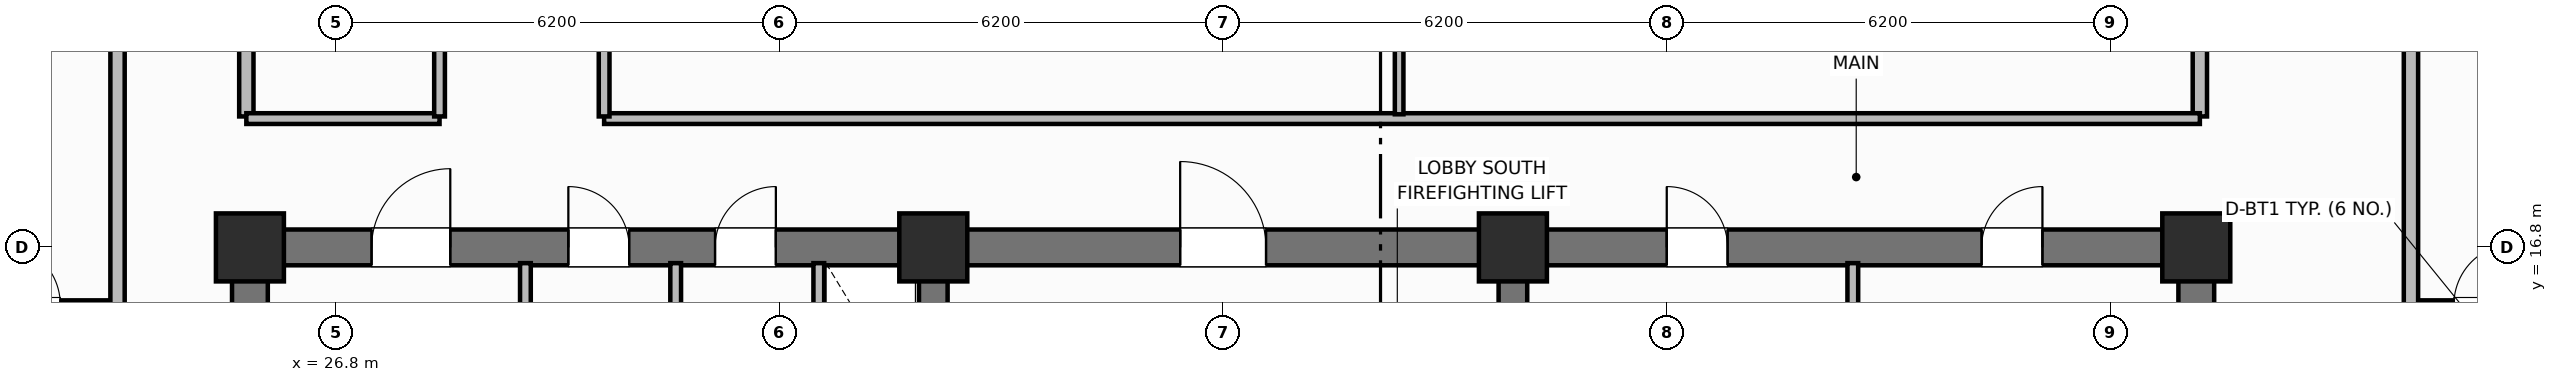
"""IFC4 building model, lengths in metres.
Left out: names, types, materials, properties, quantities, classifications, styles, units other than length and angle.
Written with IfcOpenShell. Run it as: python <this file> out.ifc"""

import sys

from ifc_helpers import new_model, si_unit, direction, frame, frame_2d, origin, origin_2d, place, context, subcontext, project, spatial, rectangle, extrude, element, fill, save


model = new_model("IFC4")
c1 = context("Model", 3, precision=1e-05, world=origin(), true_north=direction((0.0, 1.0)))
c2 = subcontext(c1, "Body", "Model", "MODEL_VIEW")
j1 = project(units=[si_unit("LENGTHUNIT", "METRE"), si_unit("PLANEANGLEUNIT", "RADIAN")], contexts=[c1])
p1 = place(None, origin())
s1 = spatial("IfcSite", under=j1, at=p1, CompositionType="ELEMENT")
p2 = place(p1, origin())
s2 = spatial("IfcBuilding", under=s1, at=p2, CompositionType="ELEMENT")
p3 = place(p2, frame((0.0, 0.0, 188.5)))
s3 = spatial("IfcBuildingStorey", under=s2, at=p3, CompositionType="ELEMENT", Elevation=188.5)
for number, where, z_axis, x_axis in (
    (1, (25.6, 10.85, 0.0), (0.0, 0.0, 1.0), (0.0, 1.0, 0.0)),
    (2, (52.8, 10.85, 0.0), (0.0, 0.0, 1.0), (0.0, 1.0, 0.0)),
):
    element("IfcWall", number, at=place(p3, frame(where, z_axis=z_axis, x_axis=x_axis)), inside=s3, PredefinedType="SHEAR", context=c2, shape_type="SweptSolid", body=[
        extrude(rectangle(XDim=5.7, YDim=0.5, at=frame_2d((2.85, 0.0))), origin(), (0.0, 0.0, 1.0), 3.7),
    ])
p4 = place(p3, frame((25.6, 16.8, 0.0), z_axis=(0.0, 0.0, 1.0), x_axis=(1.0, 0.0, 0.0)))
e3 = element("IfcWall", 3, at=p4, inside=s3, PredefinedType="SHEAR", context=c2, shape_type="SweptSolid", body=[
    extrude(rectangle(XDim=27.2, YDim=0.5, at=frame_2d((13.6, 0.0))), origin(), (0.0, 0.0, 1.0), 3.7),
])
p5 = place(p4, frame((1.7, 0.0, 0.0)))
e4 = element("IfcOpeningElement", 4, at=p5, cuts=e3, PredefinedType="OPENING", context=c2, shape_type="SweptSolid", body=[
    extrude(rectangle(XDim=1.1, YDim=2.15, at=frame_2d((0.55, 1.075))), frame((0.0, 0.26, 0.0), z_axis=(0.0, -1.0, 0.0), x_axis=(1.0, 0.0, 0.0)), (0.0, 0.0, 1.0), 0.52),
])
p6 = place(p4, frame((4.45, 0.0, 0.0)))
e5 = element("IfcOpeningElement", 5, at=p6, cuts=e3, PredefinedType="OPENING", context=c2, shape_type="SweptSolid", body=[
    extrude(rectangle(XDim=0.85, YDim=2.1, at=frame_2d((0.425, 1.05))), frame((0.0, 0.26, 0.0), z_axis=(0.0, -1.0, 0.0), x_axis=(1.0, 0.0, 0.0)), (0.0, 0.0, 1.0), 0.52),
])
p7 = place(p4, frame((6.5, 0.0, 0.0)))
e6 = element("IfcOpeningElement", 6, at=p7, cuts=e3, PredefinedType="OPENING", context=c2, shape_type="SweptSolid", body=[
    extrude(rectangle(XDim=0.85, YDim=2.1, at=frame_2d((0.425, 1.05))), frame((0.0, 0.26, 0.0), z_axis=(0.0, -1.0, 0.0), x_axis=(1.0, 0.0, 0.0)), (0.0, 0.0, 1.0), 0.52),
])
p8 = place(p4, frame((13.0, 0.0, 0.0)))
e7 = element("IfcOpeningElement", 7, at=p8, cuts=e3, PredefinedType="OPENING", context=c2, shape_type="SweptSolid", body=[
    extrude(rectangle(XDim=1.2, YDim=2.15, at=frame_2d((0.6, 1.075))), frame((0.0, 0.26, 0.0), z_axis=(0.0, -1.0, 0.0), x_axis=(1.0, 0.0, 0.0)), (0.0, 0.0, 1.0), 0.52),
])
p9 = place(p4, frame((19.8, 0.0, 0.0)))
e8 = element("IfcOpeningElement", 8, at=p9, cuts=e3, PredefinedType="OPENING", context=c2, shape_type="SweptSolid", body=[
    extrude(rectangle(XDim=0.85, YDim=2.1, at=frame_2d((0.425, 1.05))), frame((0.0, 0.26, 0.0), z_axis=(0.0, -1.0, 0.0), x_axis=(1.0, 0.0, 0.0)), (0.0, 0.0, 1.0), 0.52),
])
p10 = place(p4, frame((24.2, 0.0, 0.0)))
e9 = element("IfcOpeningElement", 9, at=p10, cuts=e3, PredefinedType="OPENING", context=c2, shape_type="SweptSolid", body=[
    extrude(rectangle(XDim=0.85, YDim=2.1, at=frame_2d((0.425, 1.05))), frame((0.0, 0.26, 0.0), z_axis=(0.0, -1.0, 0.0), x_axis=(1.0, 0.0, 0.0)), (0.0, 0.0, 1.0), 0.52),
])
for number, where, z_axis, x_axis in (
    (10, (35.15, 10.85, 0.0), (0.0, 0.0, 1.0), (0.0, 1.0, 0.0)),
    (11, (43.25, 10.85, 0.0), (0.0, 0.0, 1.0), (0.0, 1.0, 0.0)),
):
    element("IfcWall", number, at=place(p3, frame(where, z_axis=z_axis, x_axis=x_axis)), inside=s3, PredefinedType="SHEAR", context=c2, shape_type="SweptSolid", body=[
        extrude(rectangle(XDim=5.7, YDim=0.4, at=frame_2d((2.85, 0.0))), origin(), (0.0, 0.0, 1.0), 3.7),
    ])
for number, where, z_axis, x_axis in (
    (12, (25.6, 16.8, 0.0), (0.0, 0.0, 1.0), (1.0, 0.0, 0.0)),
    (13, (35.15, 16.8, 0.0), (0.0, 0.0, 1.0), (1.0, 0.0, 0.0)),
    (14, (43.25, 16.8, 0.0), (0.0, 0.0, 1.0), (1.0, 0.0, 0.0)),
    (15, (52.8, 16.8, 0.0), (0.0, 0.0, 1.0), (1.0, 0.0, 0.0)),
):
    element("IfcColumn", number, at=place(p3, frame(where, z_axis=z_axis, x_axis=x_axis)), inside=s3, PredefinedType="COLUMN", context=c2, shape_type="SweptSolid", body=[
        extrude(rectangle(XDim=0.95, YDim=0.95, at=origin_2d()), origin(), (0.0, 0.0, 1.0), 3.7),
    ])
for number, where, z_axis, x_axis in (
    (16, (29.45, 14.5, 0.0), (0.0, 0.0, 1.0), (0.0, 1.0, 0.0)),
    (17, (31.55, 14.5, 0.0), (0.0, 0.0, 1.0), (0.0, 1.0, 0.0)),
):
    element("IfcWall", number, at=place(p3, frame(where, z_axis=z_axis, x_axis=x_axis)), inside=s3, PredefinedType="PARTITIONING", context=c2, shape_type="SweptSolid", body=[
        extrude(rectangle(XDim=2.08, YDim=0.15, at=frame_2d((1.04, 0.0))), origin(), (0.0, 0.0, 1.0), 2.55),
    ])
p11 = place(p3, frame((33.55, 14.5, 0.0), z_axis=(0.0, 0.0, 1.0), x_axis=(0.0, 1.0, 0.0)))
e18 = element("IfcWall", 18, at=p11, inside=s3, PredefinedType="PARTITIONING", context=c2, shape_type="SweptSolid", body=[
    extrude(rectangle(XDim=2.08, YDim=0.15, at=frame_2d((1.04, 0.0))), origin(), (0.0, 0.0, 1.0), 2.55),
])
p12 = place(p11, frame((0.55, 0.0, 0.0)))
e19 = element("IfcOpeningElement", 19, at=p12, cuts=e18, PredefinedType="OPENING", context=c2, shape_type="SweptSolid", body=[
    extrude(rectangle(XDim=0.85, YDim=2.05, at=frame_2d((0.425, 1.025))), frame((0.0, 0.085, 0.0), z_axis=(0.0, -1.0, 0.0), x_axis=(1.0, 0.0, 0.0)), (0.0, 0.0, 1.0), 0.17),
])
p13 = place(p3, frame((48.0, 10.95, 0.0), z_axis=(0.0, 0.0, 1.0), x_axis=(0.0, 1.0, 0.0)))
e20 = element("IfcWall", 20, at=p13, inside=s3, PredefinedType="PARTITIONING", context=c2, shape_type="SweptSolid", body=[
    extrude(rectangle(XDim=5.63, YDim=0.15, at=frame_2d((2.815, 0.0))), origin(), (0.0, 0.0, 1.0), 2.55),
])
for number, where, z_axis, x_axis in (
    (21, (25.55, 18.63, 0.0), (0.0, 0.0, 1.0), (0.0, 1.0, 0.0)),
    (22, (52.85, 18.63, 0.0), (0.0, 0.0, 1.0), (0.0, 1.0, 0.0)),
):
    element("IfcWall", number, at=place(p3, frame(where, z_axis=z_axis, x_axis=x_axis)), inside=s3, PredefinedType="PARTITIONING", context=c2, shape_type="SweptSolid", body=[
        extrude(rectangle(XDim=19.14, YDim=0.2, at=frame_2d((9.57, 0.0))), origin(), (0.0, 0.0, 1.0), 2.55),
    ])
p14 = place(p3, frame((25.55, 18.6, 0.0), z_axis=(0.0, 0.0, 1.0), x_axis=(1.0, 0.0, 0.0)))
e23 = element("IfcWall", 23, at=p14, inside=s3, PredefinedType="PARTITIONING", context=c2, shape_type="SweptSolid", body=[
    extrude(rectangle(XDim=2.7, YDim=0.15, at=frame_2d((1.35, 0.0))), origin(), (0.0, 0.0, 1.0), 2.55),
])
p15 = place(p3, frame((30.55, 18.6, 0.0), z_axis=(0.0, 0.0, 1.0), x_axis=(1.0, 0.0, 0.0)))
e24 = element("IfcWall", 24, at=p15, inside=s3, PredefinedType="PARTITIONING", context=c2, shape_type="SweptSolid", body=[
    extrude(rectangle(XDim=22.3, YDim=0.15, at=frame_2d((11.15, 0.0))), origin(), (0.0, 0.0, 1.0), 2.55),
])
p16 = place(p3, frame((41.66, 18.66, 0.0), z_axis=(0.0, 0.0, 1.0), x_axis=(0.0, 1.0, 0.0)))
e25 = element("IfcWall", 25, at=p16, inside=s3, PredefinedType="PARTITIONING", context=c2, shape_type="SweptSolid", body=[
    extrude(rectangle(XDim=6.821, YDim=0.12, at=frame_2d((3.41, 0.0))), origin(), (0.0, 0.0, 1.0), 2.55),
])
p17 = place(p16, frame((2.0, 0.0, 0.0)))
e26 = element("IfcOpeningElement", 26, at=p17, cuts=e25, PredefinedType="OPENING", context=c2, shape_type="SweptSolid", body=[
    extrude(rectangle(XDim=0.9, YDim=2.1, at=frame_2d((0.45, 1.05))), frame((0.0, 0.07, 0.0), z_axis=(0.0, -1.0, 0.0), x_axis=(1.0, 0.0, 0.0)), (0.0, 0.0, 1.0), 0.14),
])
p18 = place(p3, frame((28.25, 18.63, 0.0), z_axis=(0.0, 0.0, 1.0), x_axis=(0.0, 1.0, 0.0)))
e27 = element("IfcWall", 27, at=p18, inside=s3, PredefinedType="PARTITIONING", context=c2, shape_type="SweptSolid", body=[
    extrude(rectangle(XDim=19.14, YDim=0.15, at=frame_2d((9.57, 0.0))), origin(), (0.0, 0.0, 1.0), 2.55),
])
p19 = place(p18, frame((3.0, 0.0, 0.0)))
e28 = element("IfcOpeningElement", 28, at=p19, cuts=e27, PredefinedType="OPENING", context=c2, shape_type="SweptSolid", body=[
    extrude(rectangle(XDim=0.9, YDim=2.1, at=frame_2d((0.45, 1.05))), frame((0.0, 0.085, 0.0), z_axis=(0.0, -1.0, 0.0), x_axis=(1.0, 0.0, 0.0)), (0.0, 0.0, 1.0), 0.17),
])
p20 = place(p18, frame((11.5, 0.0, 0.0)))
e29 = element("IfcOpeningElement", 29, at=p20, cuts=e27, PredefinedType="OPENING", context=c2, shape_type="SweptSolid", body=[
    extrude(rectangle(XDim=0.9, YDim=2.1, at=frame_2d((0.45, 1.05))), frame((0.0, 0.085, 0.0), z_axis=(0.0, -1.0, 0.0), x_axis=(1.0, 0.0, 0.0)), (0.0, 0.0, 1.0), 0.17),
])
p21 = place(p3, frame((30.55, 18.63, 0.0), z_axis=(0.0, 0.0, 1.0), x_axis=(0.0, 1.0, 0.0)))
e30 = element("IfcWall", 30, at=p21, inside=s3, PredefinedType="PARTITIONING", context=c2, shape_type="SweptSolid", body=[
    extrude(rectangle(XDim=19.14, YDim=0.15, at=frame_2d((9.57, 0.0))), origin(), (0.0, 0.0, 1.0), 2.55),
])
p22 = place(p21, frame((2.2, 0.0, 0.0)))
e31 = element("IfcOpeningElement", 31, at=p22, cuts=e30, PredefinedType="OPENING", context=c2, shape_type="SweptSolid", body=[
    extrude(rectangle(XDim=1.0, YDim=2.15, at=frame_2d((0.5, 1.075))), frame((0.0, 0.085, 0.0), z_axis=(0.0, -1.0, 0.0), x_axis=(1.0, 0.0, 0.0)), (0.0, 0.0, 1.0), 0.17),
])
p23 = place(p21, frame((8.89, 0.0, 0.0)))
e32 = element("IfcOpeningElement", 32, at=p23, cuts=e30, PredefinedType="OPENING", context=c2, shape_type="SweptSolid", body=[
    extrude(rectangle(XDim=1.0, YDim=2.15, at=frame_2d((0.5, 1.075))), frame((0.0, 0.085, 0.0), z_axis=(0.0, -1.0, 0.0), x_axis=(1.0, 0.0, 0.0)), (0.0, 0.0, 1.0), 0.17),
])
p24 = place(p3, frame((21.5, 16.0, 0.0), z_axis=(0.0, 0.0, 1.0), x_axis=(1.0, 0.0, 0.0)))
e33 = element("IfcWall", 33, at=p24, inside=s3, PredefinedType="PARTITIONING", context=c2, shape_type="SweptSolid", body=[
    extrude(rectangle(XDim=2.25, YDim=0.12, at=frame_2d((1.125, 0.0))), origin(), (0.0, 0.0, 1.0), 2.55),
])
p25 = place(p24, frame((0.6, 0.0, 0.0)))
e34 = element("IfcOpeningElement", 34, at=p25, cuts=e33, PredefinedType="OPENING", context=c2, shape_type="SweptSolid", body=[
    extrude(rectangle(XDim=0.85, YDim=2.1, at=frame_2d((0.425, 1.05))), frame((0.0, 0.07, 0.0), z_axis=(0.0, -1.0, 0.0), x_axis=(1.0, 0.0, 0.0)), (0.0, 0.0, 1.0), 0.14),
])
p26 = place(p3, frame((23.75, 10.6, 0.0), z_axis=(0.0, 0.0, 1.0), x_axis=(0.0, 1.0, 0.0)))
e35 = element("IfcWall", 35, at=p26, inside=s3, PredefinedType="PARTITIONING", context=c2, shape_type="SweptSolid", body=[
    extrude(rectangle(XDim=35.2, YDim=0.2, at=frame_2d((17.6, 0.0))), origin(), (0.0, 0.0, 1.0), 2.55),
])
p27 = place(p26, frame((2.65, 0.0, 0.0)))
e36 = element("IfcOpeningElement", 36, at=p27, cuts=e35, PredefinedType="OPENING", context=c2, shape_type="SweptSolid", body=[
    extrude(rectangle(XDim=1.0, YDim=2.15, at=frame_2d((0.5, 1.075))), frame((0.0, 0.11, 0.0), z_axis=(0.0, -1.0, 0.0), x_axis=(1.0, 0.0, 0.0)), (0.0, 0.0, 1.0), 0.22),
])
p28 = place(p26, frame((13.222, 0.0, 0.0)))
e37 = element("IfcOpeningElement", 37, at=p28, cuts=e35, PredefinedType="OPENING", context=c2, shape_type="SweptSolid", body=[
    extrude(rectangle(XDim=1.0, YDim=2.15, at=frame_2d((0.5, 1.075))), frame((0.0, 0.11, 0.0), z_axis=(0.0, -1.0, 0.0), x_axis=(1.0, 0.0, 0.0)), (0.0, 0.0, 1.0), 0.22),
])
p29 = place(p26, frame((24.838, 0.0, 0.0)))
e38 = element("IfcOpeningElement", 38, at=p29, cuts=e35, PredefinedType="OPENING", context=c2, shape_type="SweptSolid", body=[
    extrude(rectangle(XDim=1.0, YDim=2.15, at=frame_2d((0.5, 1.075))), frame((0.0, 0.11, 0.0), z_axis=(0.0, -1.0, 0.0), x_axis=(1.0, 0.0, 0.0)), (0.0, 0.0, 1.0), 0.22),
])
p30 = place(p3, frame((55.8, 16.0, 0.0), z_axis=(0.0, 0.0, 1.0), x_axis=(1.0, 0.0, 0.0)))
e39 = element("IfcWall", 39, at=p30, inside=s3, PredefinedType="PARTITIONING", context=c2, shape_type="SweptSolid", body=[
    extrude(rectangle(XDim=2.25, YDim=0.12, at=frame_2d((1.125, 0.0))), origin(), (0.0, 0.0, 1.0), 2.55),
])
p31 = place(p30, frame((0.6, 0.0, 0.0)))
e40 = element("IfcOpeningElement", 40, at=p31, cuts=e39, PredefinedType="OPENING", context=c2, shape_type="SweptSolid", body=[
    extrude(rectangle(XDim=0.85, YDim=2.1, at=frame_2d((0.425, 1.05))), frame((0.0, 0.07, 0.0), z_axis=(0.0, -1.0, 0.0), x_axis=(1.0, 0.0, 0.0)), (0.0, 0.0, 1.0), 0.14),
])
p32 = place(p3, frame((55.8, 10.6, 0.0), z_axis=(0.0, 0.0, 1.0), x_axis=(0.0, 1.0, 0.0)))
e41 = element("IfcWall", 41, at=p32, inside=s3, PredefinedType="PARTITIONING", context=c2, shape_type="SweptSolid", body=[
    extrude(rectangle(XDim=35.2, YDim=0.2, at=frame_2d((17.6, 0.0))), origin(), (0.0, 0.0, 1.0), 2.55),
])
p33 = place(p32, frame((2.65, 0.0, 0.0)))
e42 = element("IfcOpeningElement", 42, at=p33, cuts=e41, PredefinedType="OPENING", context=c2, shape_type="SweptSolid", body=[
    extrude(rectangle(XDim=1.0, YDim=2.15, at=frame_2d((0.5, 1.075))), frame((0.0, 0.11, 0.0), z_axis=(0.0, -1.0, 0.0), x_axis=(1.0, 0.0, 0.0)), (0.0, 0.0, 1.0), 0.22),
])
p34 = place(p32, frame((12.87, 0.0, 0.0)))
e43 = element("IfcOpeningElement", 43, at=p34, cuts=e41, PredefinedType="OPENING", context=c2, shape_type="SweptSolid", body=[
    extrude(rectangle(XDim=1.0, YDim=2.15, at=frame_2d((0.5, 1.075))), frame((0.0, 0.11, 0.0), z_axis=(0.0, -1.0, 0.0), x_axis=(1.0, 0.0, 0.0)), (0.0, 0.0, 1.0), 0.22),
])
p35 = place(p32, frame((23.65, 0.0, 0.0)))
e44 = element("IfcOpeningElement", 44, at=p35, cuts=e41, PredefinedType="OPENING", context=c2, shape_type="SweptSolid", body=[
    extrude(rectangle(XDim=1.0, YDim=2.15, at=frame_2d((0.5, 1.075))), frame((0.0, 0.11, 0.0), z_axis=(0.0, -1.0, 0.0), x_axis=(1.0, 0.0, 0.0)), (0.0, 0.0, 1.0), 0.22),
])
p36 = place(p25, origin())
e45 = element("IfcDoor", 45, at=p36, inside=s3, OperationType="SINGLE_SWING_LEFT", PredefinedType="DOOR", context=c2, shape_type="SweptSolid", body=[
    extrude(rectangle(XDim=0.85, YDim=2.1, at=frame_2d((0.425, 1.05))), frame((0.0, 0.025, 0.0), z_axis=(0.0, -1.0, 0.0), x_axis=(1.0, 0.0, 0.0)), (0.0, 0.0, 1.0), 0.05),
])
fill(e34, e45)
p37 = place(p31, origin())
e46 = element("IfcDoor", 46, at=p37, inside=s3, OperationType="SINGLE_SWING_RIGHT", PredefinedType="DOOR", context=c2, shape_type="SweptSolid", body=[
    extrude(rectangle(XDim=0.85, YDim=2.1, at=frame_2d((0.425, 1.05))), frame((0.0, 0.025, 0.0), z_axis=(0.0, -1.0, 0.0), x_axis=(1.0, 0.0, 0.0)), (0.0, 0.0, 1.0), 0.05),
])
fill(e40, e46)
p38 = place(p5, origin())
e47 = element("IfcDoor", 47, at=p38, inside=s3, OperationType="SINGLE_SWING_RIGHT", PredefinedType="DOOR", context=c2, shape_type="SweptSolid", body=[
    extrude(rectangle(XDim=1.1, YDim=2.15, at=frame_2d((0.55, 1.075))), frame((0.0, 0.025, 0.0), z_axis=(0.0, -1.0, 0.0), x_axis=(1.0, 0.0, 0.0)), (0.0, 0.0, 1.0), 0.05),
])
fill(e4, e47)
p39 = place(p6, origin())
e48 = element("IfcDoor", 48, at=p39, inside=s3, OperationType="SINGLE_SWING_LEFT", PredefinedType="DOOR", context=c2, shape_type="SweptSolid", body=[
    extrude(rectangle(XDim=0.85, YDim=2.1, at=frame_2d((0.425, 1.05))), frame((0.0, 0.025, 0.0), z_axis=(0.0, -1.0, 0.0), x_axis=(1.0, 0.0, 0.0)), (0.0, 0.0, 1.0), 0.05),
])
fill(e5, e48)
p40 = place(p7, origin())
e49 = element("IfcDoor", 49, at=p40, inside=s3, OperationType="SINGLE_SWING_RIGHT", PredefinedType="DOOR", context=c2, shape_type="SweptSolid", body=[
    extrude(rectangle(XDim=0.85, YDim=2.1, at=frame_2d((0.425, 1.05))), frame((0.0, 0.025, 0.0), z_axis=(0.0, -1.0, 0.0), x_axis=(1.0, 0.0, 0.0)), (0.0, 0.0, 1.0), 0.05),
])
fill(e6, e49)
p41 = place(p8, origin())
e50 = element("IfcDoor", 50, at=p41, inside=s3, OperationType="SINGLE_SWING_LEFT", PredefinedType="DOOR", context=c2, shape_type="SweptSolid", body=[
    extrude(rectangle(XDim=1.2, YDim=2.15, at=frame_2d((0.6, 1.075))), frame((0.0, 0.025, 0.0), z_axis=(0.0, -1.0, 0.0), x_axis=(1.0, 0.0, 0.0)), (0.0, 0.0, 1.0), 0.05),
])
fill(e7, e50)
p42 = place(p9, origin())
e51 = element("IfcDoor", 51, at=p42, inside=s3, OperationType="SINGLE_SWING_LEFT", PredefinedType="DOOR", context=c2, shape_type="SweptSolid", body=[
    extrude(rectangle(XDim=0.85, YDim=2.1, at=frame_2d((0.425, 1.05))), frame((0.0, 0.025, 0.0), z_axis=(0.0, -1.0, 0.0), x_axis=(1.0, 0.0, 0.0)), (0.0, 0.0, 1.0), 0.05),
])
fill(e8, e51)
p43 = place(p10, origin())
e52 = element("IfcDoor", 52, at=p43, inside=s3, OperationType="SINGLE_SWING_RIGHT", PredefinedType="DOOR", context=c2, shape_type="SweptSolid", body=[
    extrude(rectangle(XDim=0.85, YDim=2.1, at=frame_2d((0.425, 1.05))), frame((0.0, 0.025, 0.0), z_axis=(0.0, -1.0, 0.0), x_axis=(1.0, 0.0, 0.0)), (0.0, 0.0, 1.0), 0.05),
])
fill(e9, e52)
save(model, sys.argv[1])
